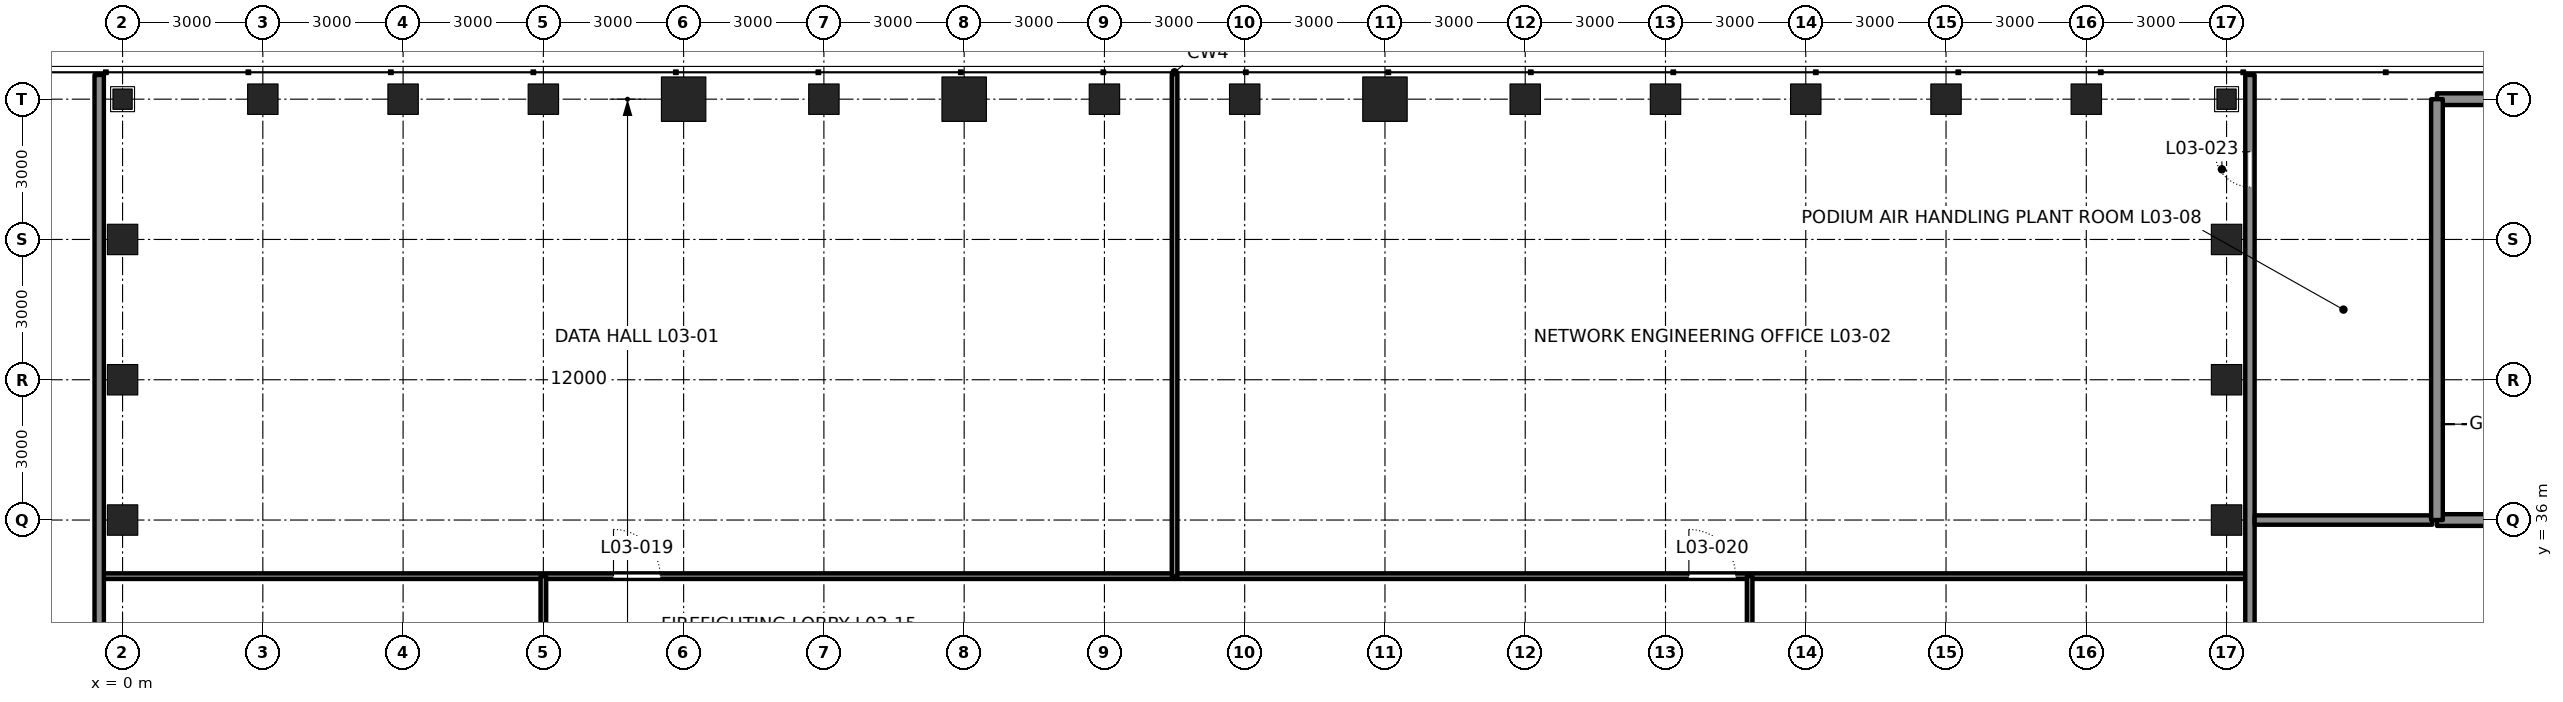
"""IFC4 building model, lengths in metres.
Left out: names, types, materials, properties, quantities, classifications, styles, units other than length and angle.
Written with IfcOpenShell. Run it as: python <this file> out.ifc"""

import sys

from ifc_helpers import new_model, si_unit, direction, frame, frame_2d, origin, origin_2d, place, context, subcontext, project, spatial, rectangle, hollow_rectangle, i_section, extrude, element, fill, save


model = new_model("IFC4")
c1 = context("Model", 3, precision=1e-05, world=origin(), true_north=direction((0.0, 1.0)))
c2 = subcontext(c1, "Body", "Model", "MODEL_VIEW")
j1 = project(units=[si_unit("LENGTHUNIT", "METRE"), si_unit("PLANEANGLEUNIT", "RADIAN")], contexts=[c1])
p1 = place(None, origin())
s1 = spatial("IfcSite", under=j1, at=p1, CompositionType="ELEMENT")
p2 = place(p1, origin())
s2 = spatial("IfcBuilding", under=s1, at=p2, CompositionType="ELEMENT")
p3 = place(p2, frame((0.0, 0.0, 19.5)))
s3 = spatial("IfcBuildingStorey", under=s2, at=p3, CompositionType="ELEMENT", Elevation=19.5)
for number, where, z_axis, x_axis in (
    (1, (45.0, 36.0, 0.0), (0.0, 0.0, 1.0), (1.0, 0.0, 0.0)),
    (2, (45.0, 39.0, 0.0), (0.0, 0.0, 1.0), (1.0, 0.0, 0.0)),
    (3, (45.0, 42.0, 0.0), (0.0, 0.0, 1.0), (1.0, 0.0, 0.0)),
    (4, (42.0, 45.0, 0.0), (0.0, 0.0, 1.0), (0.0, 1.0, 0.0)),
    (5, (39.0, 45.0, 0.0), (0.0, 0.0, 1.0), (0.0, 1.0, 0.0)),
    (6, (36.0, 45.0, 0.0), (0.0, 0.0, 1.0), (0.0, 1.0, 0.0)),
    (7, (33.0, 45.0, 0.0), (0.0, 0.0, 1.0), (0.0, 1.0, 0.0)),
    (8, (30.0, 45.0, 0.0), (0.0, 0.0, 1.0), (0.0, 1.0, 0.0)),
):
    element("IfcColumn", number, at=place(p3, frame(where, z_axis=z_axis, x_axis=x_axis)), inside=s3, PredefinedType="COLUMN", context=c2, shape_type="SweptSolid", body=[
        extrude(hollow_rectangle(XDim=0.65, YDim=0.65, WallThickness=0.065, at=origin_2d()), origin(), (0.0, 0.0, 1.0), 4.8),
    ])
p4 = place(p3, frame((27.0, 45.0, 0.0), z_axis=(0.0, 0.0, 1.0), x_axis=(0.0, 1.0, 0.0)))
e9 = element("IfcColumn", 9, at=p4, inside=s3, PredefinedType="COLUMN", context=c2, shape_type="SweptSolid", body=[
    extrude(hollow_rectangle(XDim=0.95, YDim=0.95, WallThickness=0.11, at=origin_2d()), origin(), (0.0, 0.0, 1.0), 4.8),
])
for number, where, z_axis, x_axis in (
    (10, (24.0, 45.0, 0.0), (0.0, 0.0, 1.0), (0.0, 1.0, 0.0)),
    (11, (21.0, 45.0, 0.0), (0.0, 0.0, 1.0), (0.0, 1.0, 0.0)),
):
    element("IfcColumn", number, at=place(p3, frame(where, z_axis=z_axis, x_axis=x_axis)), inside=s3, PredefinedType="COLUMN", context=c2, shape_type="SweptSolid", body=[
        extrude(hollow_rectangle(XDim=0.65, YDim=0.65, WallThickness=0.065, at=origin_2d()), origin(), (0.0, 0.0, 1.0), 4.8),
    ])
p5 = place(p3, frame((18.0, 45.0, 0.0), z_axis=(0.0, 0.0, 1.0), x_axis=(0.0, 1.0, 0.0)))
e12 = element("IfcColumn", 12, at=p5, inside=s3, PredefinedType="COLUMN", context=c2, shape_type="SweptSolid", body=[
    extrude(hollow_rectangle(XDim=0.95, YDim=0.95, WallThickness=0.11, at=origin_2d()), origin(), (0.0, 0.0, 1.0), 4.8),
])
p6 = place(p3, frame((15.0, 45.0, 0.0), z_axis=(0.0, 0.0, 1.0), x_axis=(0.0, 1.0, 0.0)))
e13 = element("IfcColumn", 13, at=p6, inside=s3, PredefinedType="COLUMN", context=c2, shape_type="SweptSolid", body=[
    extrude(hollow_rectangle(XDim=0.65, YDim=0.65, WallThickness=0.065, at=origin_2d()), origin(), (0.0, 0.0, 1.0), 4.8),
])
p7 = place(p3, frame((12.0, 45.0, 0.0), z_axis=(0.0, 0.0, 1.0), x_axis=(0.0, 1.0, 0.0)))
e14 = element("IfcColumn", 14, at=p7, inside=s3, PredefinedType="COLUMN", context=c2, shape_type="SweptSolid", body=[
    extrude(hollow_rectangle(XDim=0.95, YDim=0.95, WallThickness=0.11, at=origin_2d()), origin(), (0.0, 0.0, 1.0), 4.8),
])
for number, where, z_axis, x_axis in (
    (15, (9.0, 45.0, 0.0), (0.0, 0.0, 1.0), (0.0, 1.0, 0.0)),
    (16, (6.0, 45.0, 0.0), (0.0, 0.0, 1.0), (0.0, 1.0, 0.0)),
    (17, (3.0, 45.0, 0.0), (0.0, 0.0, 1.0), (0.0, 1.0, 0.0)),
    (18, (0.0, 42.0, 0.0), (0.0, 0.0, 1.0), (-1.0, 0.0, 0.0)),
    (19, (0.0, 39.0, 0.0), (0.0, 0.0, 1.0), (-1.0, 0.0, 0.0)),
    (20, (0.0, 36.0, 0.0), (0.0, 0.0, 1.0), (-1.0, 0.0, 0.0)),
):
    element("IfcColumn", number, at=place(p3, frame(where, z_axis=z_axis, x_axis=x_axis)), inside=s3, PredefinedType="COLUMN", context=c2, shape_type="SweptSolid", body=[
        extrude(hollow_rectangle(XDim=0.65, YDim=0.65, WallThickness=0.065, at=origin_2d()), origin(), (0.0, 0.0, 1.0), 4.8),
    ])
for number, where, z_axis, x_axis in (
    (21, (0.0, 45.0, 0.0), (0.0, 0.0, 1.0), (1.0, 0.0, 0.0)),
    (22, (45.0, 45.0, 0.0), (0.0, 0.0, 1.0), (1.0, 0.0, 0.0)),
):
    element("IfcColumn", number, at=place(p3, frame(where, z_axis=z_axis, x_axis=x_axis)), inside=s3, PredefinedType="COLUMN", context=c2, shape_type="SweptSolid", body=[
        extrude(i_section(OverallWidth=0.411, OverallDepth=0.434, WebThickness=0.036, FlangeThickness=0.057, at=origin_2d()), origin(), (0.0, 0.0, 1.0), 4.8),
    ])
p8 = place(p3, frame((-0.5, 34.8, 0.0), z_axis=(0.0, 0.0, 1.0), x_axis=(1.0, 0.0, 0.0)))
e23 = element("IfcWall", 23, at=p8, inside=s3, PredefinedType="PARTITIONING", context=c2, shape_type="SweptSolid", body=[
    extrude(rectangle(XDim=23.0, YDim=0.12, at=frame_2d((11.5, 0.0))), origin(), (0.0, 0.0, 1.0), 4.34),
])
p9 = place(p8, frame((11.0, 0.0, 0.0)))
e24 = element("IfcOpeningElement", 24, at=p9, cuts=e23, PredefinedType="OPENING", context=c2, shape_type="SweptSolid", body=[
    extrude(rectangle(XDim=1.0, YDim=2.4, at=frame_2d((0.5, 1.2))), frame((0.0, 0.07, 0.0), z_axis=(0.0, -1.0, 0.0), x_axis=(1.0, 0.0, 0.0)), (0.0, 0.0, 1.0), 0.14),
])
p10 = place(p3, frame((22.5, 34.8, 0.0), z_axis=(0.0, 0.0, 1.0), x_axis=(1.0, 0.0, 0.0)))
e25 = element("IfcWall", 25, at=p10, inside=s3, PredefinedType="PARTITIONING", context=c2, shape_type="SweptSolid", body=[
    extrude(rectangle(XDim=23.0, YDim=0.12, at=frame_2d((11.5, 0.0))), origin(), (0.0, 0.0, 1.0), 4.34),
])
p11 = place(p10, frame((11.0, 0.0, 0.0)))
e26 = element("IfcOpeningElement", 26, at=p11, cuts=e25, PredefinedType="OPENING", context=c2, shape_type="SweptSolid", body=[
    extrude(rectangle(XDim=1.0, YDim=2.4, at=frame_2d((0.5, 1.2))), frame((0.0, 0.07, 0.0), z_axis=(0.0, -1.0, 0.0), x_axis=(1.0, 0.0, 0.0)), (0.0, 0.0, 1.0), 0.14),
])
p12 = place(p3, frame((9.0, -0.5, 0.0), z_axis=(0.0, 0.0, 1.0), x_axis=(0.0, 1.0, 0.0)))
e27 = element("IfcWall", 27, at=p12, inside=s3, PredefinedType="PARTITIONING", context=c2, shape_type="SweptSolid", body=[
    extrude(rectangle(XDim=35.3, YDim=0.12, at=frame_2d((17.65, 0.0))), origin(), (0.0, 0.0, 1.0), 3.653),
])
p13 = place(p12, frame((17.15, 0.0, 0.0)))
e28 = element("IfcOpeningElement", 28, at=p13, cuts=e27, PredefinedType="OPENING", context=c2, shape_type="SweptSolid", body=[
    extrude(rectangle(XDim=1.0, YDim=2.4, at=frame_2d((0.5, 1.2))), frame((0.0, 0.07, 0.0), z_axis=(0.0, -1.0, 0.0), x_axis=(1.0, 0.0, 0.0)), (0.0, 0.0, 1.0), 0.14),
])
p14 = place(p3, frame((34.8, 12.0, 0.0), z_axis=(0.0, 0.0, 1.0), x_axis=(0.0, 1.0, 0.0)))
e29 = element("IfcWall", 29, at=p14, inside=s3, PredefinedType="PARTITIONING", context=c2, shape_type="SweptSolid", body=[
    extrude(rectangle(XDim=22.8, YDim=0.12, at=frame_2d((11.4, 0.0))), origin(), (0.0, 0.0, 1.0), 4.34),
])
p15 = place(p14, frame((10.9, 0.0, 0.0)))
e30 = element("IfcOpeningElement", 30, at=p15, cuts=e29, PredefinedType="OPENING", context=c2, shape_type="SweptSolid", body=[
    extrude(rectangle(XDim=1.0, YDim=2.4, at=frame_2d((0.5, 1.2))), frame((0.0, 0.07, 0.0), z_axis=(0.0, -1.0, 0.0), x_axis=(1.0, 0.0, 0.0)), (0.0, 0.0, 1.0), 0.14),
])
p16 = place(p3, frame((22.5, 34.8, 0.0), z_axis=(0.0, 0.0, 1.0), x_axis=(0.0, 1.0, 0.0)))
e31 = element("IfcWall", 31, at=p16, inside=s3, PredefinedType="PARTITIONING", context=c2, shape_type="SweptSolid", body=[
    extrude(rectangle(XDim=10.743, YDim=0.12, at=frame_2d((5.372, 0.0))), origin(), (0.0, 0.0, 1.0), 4.34),
])
p17 = place(p3, frame((-0.5, -0.5, 0.0), z_axis=(0.0, 0.0, 1.0), x_axis=(0.0, 1.0, 0.0)))
e32 = element("IfcWall", 32, at=p17, inside=s3, PredefinedType="PARTITIONING", context=c2, shape_type="SweptSolid", body=[
    extrude(rectangle(XDim=46.018, YDim=0.2, at=frame_2d((23.009, 0.0))), origin(), (0.0, 0.0, 1.0), 4.64),
])
p18 = place(p17, frame((13.1, 0.0, 0.0)))
e33 = element("IfcOpeningElement", 33, at=p18, cuts=e32, PredefinedType="OPENING", context=c2, shape_type="SweptSolid", body=[
    extrude(rectangle(XDim=1.8, YDim=2.4, at=frame_2d((0.9, 1.2))), frame((0.0, 0.11, 0.0), z_axis=(0.0, -1.0, 0.0), x_axis=(1.0, 0.0, 0.0)), (0.0, 0.0, 1.0), 0.22),
])
p19 = place(p3, frame((45.5, -0.5, 0.0), z_axis=(0.0, 0.0, 1.0), x_axis=(0.0, 1.0, 0.0)))
e34 = element("IfcWall", 34, at=p19, inside=s3, PredefinedType="PARTITIONING", context=c2, shape_type="SweptSolid", body=[
    extrude(rectangle(XDim=46.018, YDim=0.2, at=frame_2d((23.009, 0.0))), origin(), (0.0, 0.0, 1.0), 4.64),
])
p20 = place(p19, frame((43.625, 0.0, 0.0)))
e35 = element("IfcOpeningElement", 35, at=p20, cuts=e34, PredefinedType="OPENING", context=c2, shape_type="SweptSolid", body=[
    extrude(rectangle(XDim=0.75, YDim=2.1, at=frame_2d((0.375, 1.05))), frame((0.0, 0.11, 0.0), z_axis=(0.0, -1.0, 0.0), x_axis=(1.0, 0.0, 0.0)), (0.0, 0.0, 1.0), 0.22),
])
p21 = place(p19, frame((10.1, 0.0, 0.0)))
e36 = element("IfcOpeningElement", 36, at=p21, cuts=e34, PredefinedType="OPENING", context=c2, shape_type="SweptSolid", body=[
    extrude(rectangle(XDim=1.8, YDim=2.4, at=frame_2d((0.9, 1.2))), frame((0.0, 0.11, 0.0), z_axis=(0.0, -1.0, 0.0), x_axis=(1.0, 0.0, 0.0)), (0.0, 0.0, 1.0), 0.22),
])
p22 = place(p3, frame((45.6, 36.0, 0.0), z_axis=(0.0, 0.0, 1.0), x_axis=(1.0, 0.0, 0.0)))
e37 = element("IfcWall", 37, at=p22, inside=s3, PredefinedType="PARTITIONING", context=c2, shape_type="SweptSolid", body=[
    extrude(rectangle(XDim=3.8, YDim=0.2, at=frame_2d((1.9, 0.0))), origin(), (0.0, 0.0, 1.0), 3.653),
])
p23 = place(p3, frame((49.5, 36.0, 0.0), z_axis=(0.0, 0.0, 1.0), x_axis=(1.0, 0.0, 0.0)))
e38 = element("IfcWall", 38, at=p23, inside=s3, PredefinedType="SOLIDWALL", context=c2, shape_type="SweptSolid", body=[
    extrude(rectangle(XDim=4.25, YDim=0.25, at=frame_2d((2.125, 0.0))), origin(), (0.0, 0.0, 1.0), 3.653),
])
p24 = place(p23, frame((1.65, 0.0, 0.0)))
e39 = element("IfcOpeningElement", 39, at=p24, cuts=e38, PredefinedType="OPENING", context=c2, shape_type="SweptSolid", body=[
    extrude(rectangle(XDim=1.2, YDim=2.1, at=frame_2d((0.6, 1.05))), frame((0.0, 0.135, 0.0), z_axis=(0.0, -1.0, 0.0), x_axis=(1.0, 0.0, 0.0)), (0.0, 0.0, 1.0), 0.27),
])
p25 = place(p3, frame((49.5, 45.0, 0.0), z_axis=(0.0, 0.0, 1.0), x_axis=(1.0, 0.0, 0.0)))
e40 = element("IfcWall", 40, at=p25, inside=s3, PredefinedType="SOLIDWALL", context=c2, shape_type="SweptSolid", body=[
    extrude(rectangle(XDim=4.25, YDim=0.25, at=frame_2d((2.125, 0.0))), origin(), (0.0, 0.0, 1.0), 3.653),
])
p26 = place(p3, frame((49.5, 36.0, 0.0), z_axis=(0.0, 0.0, 1.0), x_axis=(0.0, 1.0, 0.0)))
e41 = element("IfcWall", 41, at=p26, inside=s3, PredefinedType="SOLIDWALL", context=c2, shape_type="SweptSolid", body=[
    extrude(rectangle(XDim=9.0, YDim=0.25, at=frame_2d((4.5, 0.0))), origin(), (0.0, 0.0, 1.0), 4.64),
])
p27 = place(p9, origin())
e42 = element("IfcDoor", 42, at=p27, inside=s3, OperationType="SINGLE_SWING_LEFT", PredefinedType="DOOR", context=c2, shape_type="SweptSolid", body=[
    extrude(rectangle(XDim=1.0, YDim=2.4, at=frame_2d((0.5, 1.2))), frame((0.0, 0.025, 0.0), z_axis=(0.0, -1.0, 0.0), x_axis=(1.0, 0.0, 0.0)), (0.0, 0.0, 1.0), 0.05),
])
fill(e24, e42)
p28 = place(p11, origin())
e43 = element("IfcDoor", 43, at=p28, inside=s3, OperationType="SINGLE_SWING_LEFT", PredefinedType="DOOR", context=c2, shape_type="SweptSolid", body=[
    extrude(rectangle(XDim=1.0, YDim=2.4, at=frame_2d((0.5, 1.2))), frame((0.0, 0.025, 0.0), z_axis=(0.0, -1.0, 0.0), x_axis=(1.0, 0.0, 0.0)), (0.0, 0.0, 1.0), 0.05),
])
fill(e26, e43)
p29 = place(p20, origin())
e44 = element("IfcDoor", 44, at=p29, inside=s3, OperationType="SINGLE_SWING_RIGHT", PredefinedType="DOOR", context=c2, shape_type="SweptSolid", body=[
    extrude(rectangle(XDim=0.75, YDim=2.1, at=frame_2d((0.375, 1.05))), frame((0.0, 0.025, 0.0), z_axis=(0.0, -1.0, 0.0), x_axis=(1.0, 0.0, 0.0)), (0.0, 0.0, 1.0), 0.05),
])
fill(e35, e44)
save(model, sys.argv[1])
